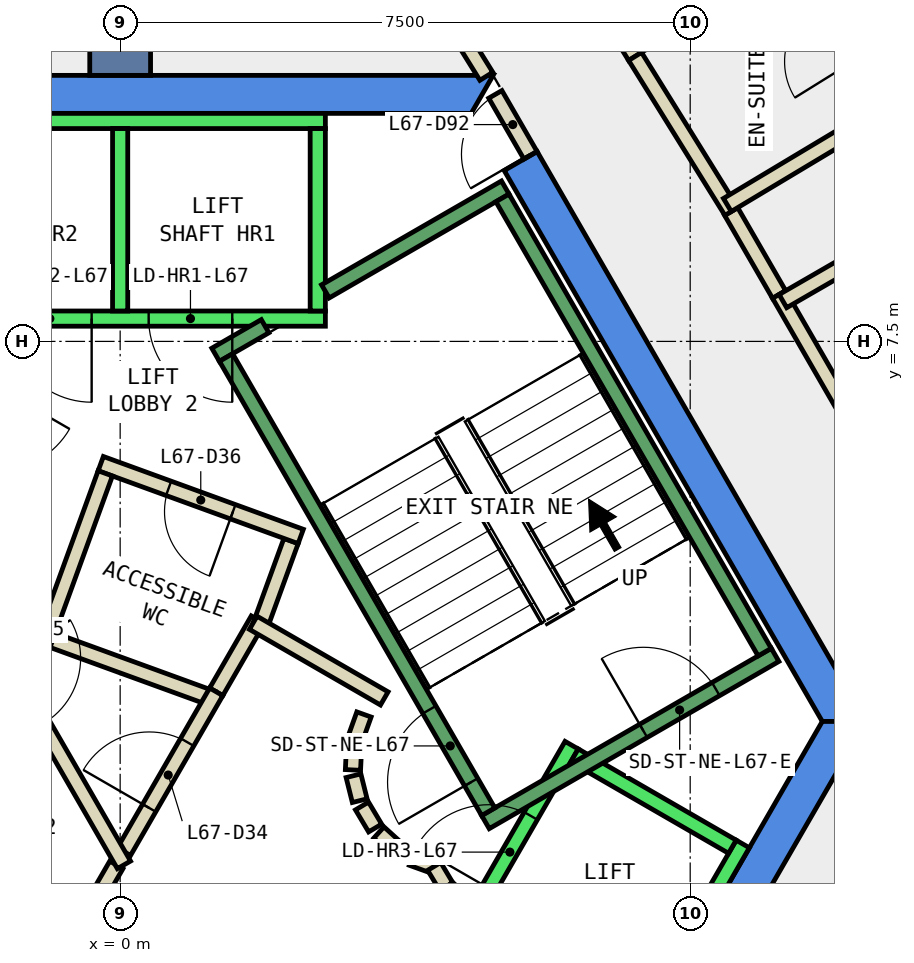
"""IFC4 building model, lengths in metres.
Left out: names, types, materials, properties, quantities, classifications, styles, units other than length and angle.
Written with IfcOpenShell. Run it as: python <this file> out.ifc"""

import sys

from ifc_helpers import new_model, si_unit, direction, frame, frame_2d, origin, place, context, subcontext, project, spatial, polyline, rectangle, outline, extrude, element, fill, save


model = new_model("IFC4")
c1 = context("Model", 3, precision=1e-05, world=origin(), true_north=direction((0.0, 1.0)))
c2 = subcontext(c1, "Body", "Model", "MODEL_VIEW")
j1 = project(units=[si_unit("LENGTHUNIT", "METRE"), si_unit("PLANEANGLEUNIT", "RADIAN")], contexts=[c1])
p1 = place(None, origin())
s1 = spatial("IfcSite", under=j1, at=p1, CompositionType="ELEMENT")
p2 = place(p1, origin())
s2 = spatial("IfcBuilding", under=s1, at=p2, CompositionType="ELEMENT")
p3 = place(p2, frame((0.0, 0.0, 290.0)))
s3 = spatial("IfcBuildingStorey", under=s2, at=p3, CompositionType="ELEMENT", Elevation=290.0)
p4 = place(p3, frame((0.0, 0.0, -0.34)))
e1 = element("IfcWall", 1, at=p4, inside=s3, PredefinedType="SHEAR", context=c2, shape_type="SweptSolid", body=[
    extrude(outline(polyline([(5.486, 9.998), (5.053, 9.748), (9.238, 2.5), (9.815, 2.5), (5.486, 9.998)])), origin(), (0.0, 0.0, 1.0), 3.6),
])
p5 = place(p3, frame((0.0, 0.0, -0.34)))
e2 = element("IfcWall", 2, at=p5, inside=s3, PredefinedType="SHEAR", context=c2, shape_type="SweptSolid", body=[
    extrude(outline(polyline([(4.907, 11.0), (-4.907, 11.0), (-4.619, 10.5), (4.619, 10.5), (4.907, 11.0)])), origin(), (0.0, 0.0, 1.0), 3.6),
])
p6 = place(p3, frame((0.0, 0.0, -0.34)))
e3 = element("IfcWall", 3, at=p6, inside=s3, PredefinedType="SHEAR", context=c2, shape_type="SweptSolid", body=[
    extrude(outline(polyline([(4.907, -6.0), (9.815, 2.5), (9.238, 2.5), (4.619, -5.5), (4.907, -6.0)])), origin(), (0.0, 0.0, 1.0), 3.6),
])
p7 = place(p3, frame((0.0, 11.0, -0.34), z_axis=(0.0, 0.0, 1.0), x_axis=(0.0, 1.0, 0.0)))
e4 = element("IfcWall", 4, at=p7, inside=s3, PredefinedType="SHEAR", context=c2, shape_type="SweptSolid", body=[
    extrude(rectangle(XDim=9.0, YDim=0.8, at=frame_2d((4.5, 0.0))), origin(), (0.0, 0.0, 1.0), 3.6),
])
p8 = place(p3, frame((1.264, 2.89, 0.0), z_axis=(0.0, 0.0, 1.0), x_axis=(0.500043792738, 0.866000118559, 0.0)))
e5 = element("IfcWall", 5, at=p8, inside=s3, PredefinedType="PARTITIONING", context=c2, shape_type="SweptSolid", body=[
    extrude(rectangle(XDim=1.096, YDim=0.2, at=frame_2d((0.548, 0.0))), origin(), (0.0, 0.0, 1.0), 3.26),
])
p9 = place(p3, frame((1.838, 3.748, 0.0), z_axis=(0.0, 0.0, 1.0), x_axis=(0.342266462435, 0.939602931398, 0.0)))
e6 = element("IfcWall", 6, at=p9, inside=s3, PredefinedType="PARTITIONING", context=c2, shape_type="SweptSolid", body=[
    extrude(rectangle(XDim=1.198, YDim=0.2, at=frame_2d((0.599, 0.0))), origin(), (0.0, 0.0, 1.0), 3.26),
])
p10 = place(p3, frame((2.376, 4.934, 0.0), z_axis=(0.0, 0.0, 1.0), x_axis=(-0.939640574808, 0.342163104635, 0.0)))
e7 = element("IfcWall", 7, at=p10, inside=s3, PredefinedType="PARTITIONING", context=c2, shape_type="SweptSolid", body=[
    extrude(rectangle(XDim=2.8, YDim=0.2, at=frame_2d((1.4, 0.0))), origin(), (0.0, 0.0, 1.0), 3.26),
])
p11 = place(p10, frame((0.95, 0.0, 0.0)))
e8 = element("IfcOpeningElement", 8, at=p11, cuts=e7, PredefinedType="OPENING", context=c2, shape_type="SweptSolid", body=[
    extrude(rectangle(XDim=0.9, YDim=2.1, at=frame_2d((0.45, 1.05))), frame((0.0, 0.11, 0.0), z_axis=(0.0, -1.0, 0.0), x_axis=(1.0, 0.0, 0.0)), (0.0, 0.0, 1.0), 0.22),
])
p12 = place(p3, frame((-0.196, 5.764, 0.0), z_axis=(0.0, 0.0, 1.0), x_axis=(-0.34165322761, -0.939826086073, 0.0)))
e9 = element("IfcWall", 9, at=p12, inside=s3, PredefinedType="PARTITIONING", context=c2, shape_type="SweptSolid", body=[
    extrude(rectangle(XDim=2.4, YDim=0.2, at=frame_2d((1.2, 0.0))), origin(), (0.0, 0.0, 1.0), 3.26),
])
p13 = place(p3, frame((-0.888, 3.568, 0.0), z_axis=(0.0, 0.0, 1.0), x_axis=(0.939685034098, -0.34204098686, 0.0)))
e10 = element("IfcWall", 10, at=p13, inside=s3, PredefinedType="PARTITIONING", context=c2, shape_type="SweptSolid", body=[
    extrude(rectangle(XDim=2.237, YDim=0.2, at=frame_2d((1.119, 0.0))), origin(), (0.0, 0.0, 1.0), 3.26),
])
p14 = place(p3, frame((2.62, 14.526, 0.0), z_axis=(0.0, 0.0, 1.0), x_axis=(0.527726136463, -0.84941457775, 0.0)))
e11 = element("IfcWall", 11, at=p14, inside=s3, PredefinedType="PARTITIONING", context=c2, shape_type="SweptSolid", body=[
    extrude(rectangle(XDim=4.165, YDim=0.2, at=frame_2d((2.083, 0.0))), origin(), (0.0, 0.0, 1.0), 2.4),
])
p15 = place(p14, frame((1.583, 0.0, 0.0)))
e12 = element("IfcOpeningElement", 12, at=p15, cuts=e11, PredefinedType="OPENING", context=c2, shape_type="SweptSolid", body=[
    extrude(rectangle(XDim=1.0, YDim=2.1, at=frame_2d((0.5, 1.05))), frame((0.0, 0.11, 0.0), z_axis=(0.0, -1.0, 0.0), x_axis=(1.0, 0.0, 0.0)), (0.0, 0.0, 1.0), 0.22),
])
p16 = place(p3, frame((8.039, 9.209, 0.0), z_axis=(0.0, 0.0, 1.0), x_axis=(0.500219543227, -0.865898613334, 0.0)))
e13 = element("IfcWall", 13, at=p16, inside=s3, PredefinedType="PARTITIONING", context=c2, shape_type="SweptSolid", body=[
    extrude(rectangle(XDim=1.261, YDim=0.2, at=frame_2d((0.631, 0.0))), origin(), (0.0, 0.0, 1.0), 3.26),
])
p17 = place(p3, frame((8.67, 8.117, 0.0), z_axis=(0.0, 0.0, 1.0), x_axis=(0.50002537861, -0.866010750942, 0.0)))
e14 = element("IfcWall", 14, at=p17, inside=s3, PredefinedType="PARTITIONING", context=c2, shape_type="SweptSolid", body=[
    extrude(rectangle(XDim=3.0, YDim=0.2, at=frame_2d((1.5, 0.0))), origin(), (0.0, 0.0, 1.0), 3.26),
])
p18 = place(p3, frame((4.022, 15.68, 0.0), z_axis=(0.0, 0.0, 1.0), x_axis=(0.527737948498, -0.849407239029, 0.0)))
e15 = element("IfcWall", 15, at=p18, inside=s3, PredefinedType="PARTITIONING", context=c2, shape_type="SweptSolid", body=[
    extrude(rectangle(XDim=5.217, YDim=0.2, at=frame_2d((2.608, 0.0))), origin(), (0.0, 0.0, 1.0), 3.26),
])
p19 = place(p18, frame((2.159, 0.0, 0.0)))
e16 = element("IfcOpeningElement", 16, at=p19, cuts=e15, PredefinedType="OPENING", context=c2, shape_type="SweptSolid", body=[
    extrude(rectangle(XDim=1.0, YDim=2.1, at=frame_2d((0.5, 1.05))), frame((0.0, 0.11, 0.0), z_axis=(0.0, -1.0, 0.0), x_axis=(1.0, 0.0, 0.0)), (0.0, 0.0, 1.0), 0.22),
])
p20 = place(p3, frame((6.775, 11.249, 0.0), z_axis=(0.0, 0.0, 1.0), x_axis=(0.527803270752, -0.849366650736, 0.0)))
e17 = element("IfcWall", 17, at=p20, inside=s3, PredefinedType="PARTITIONING", context=c2, shape_type="SweptSolid", body=[
    extrude(rectangle(XDim=2.401, YDim=0.2, at=frame_2d((1.2, 0.0))), origin(), (0.0, 0.0, 1.0), 3.26),
])
p21 = place(p3, frame((-0.982, -1.0, 0.0), z_axis=(0.0, 0.0, 1.0), x_axis=(0.50024047865, 0.865886518847, 0.0)))
e18 = element("IfcWall", 18, at=p21, inside=s3, PredefinedType="PARTITIONING", context=c2, shape_type="SweptSolid", body=[
    extrude(rectangle(XDim=1.863, YDim=0.2, at=frame_2d((0.931, 0.0))), origin(), (0.0, 0.0, 1.0), 3.26),
])
p22 = place(p3, frame((0.05, 0.787, 0.0), z_axis=(0.0, 0.0, 1.0), x_axis=(0.499945861543, 0.866056658381, 0.0)))
e19 = element("IfcWall", 19, at=p22, inside=s3, PredefinedType="PARTITIONING", context=c2, shape_type="SweptSolid", body=[
    extrude(rectangle(XDim=2.428, YDim=0.2, at=frame_2d((1.214, 0.0))), origin(), (0.0, 0.0, 1.0), 3.26),
])
p23 = place(p22, frame((0.664, 0.0, 0.0)))
e20 = element("IfcOpeningElement", 20, at=p23, cuts=e19, PredefinedType="OPENING", context=c2, shape_type="SweptSolid", body=[
    extrude(rectangle(XDim=1.0, YDim=2.1, at=frame_2d((0.5, 1.05))), frame((0.0, 0.11, 0.0), z_axis=(0.0, -1.0, 0.0), x_axis=(1.0, 0.0, 0.0)), (0.0, 0.0, 1.0), 0.22),
])
p24 = place(p3, frame((1.751, 3.798, 0.0), z_axis=(0.0, 0.0, 1.0), x_axis=(0.866091650241, -0.499885240213, 0.0)))
e21 = element("IfcWall", 21, at=p24, inside=s3, PredefinedType="PARTITIONING", context=c2, shape_type="SweptSolid", body=[
    extrude(rectangle(XDim=1.991, YDim=0.2, at=frame_2d((0.995, 0.0))), origin(), (0.0, 0.0, 1.0), 3.26),
])
p25 = place(p3, frame((3.208, 2.592, 0.0), z_axis=(0.0, 0.0, 1.0), x_axis=(-0.337388820924, -0.941365382578, 0.0)))
e22 = element("IfcWall", 22, at=p25, inside=s3, PredefinedType="PARTITIONING", context=c2, shape_type="SweptSolid", body=[
    extrude(rectangle(XDim=0.338, YDim=0.2, at=frame_2d((0.169, 0.0))), origin(), (0.0, 0.0, 1.0), 3.26),
])
p26 = place(p3, frame((3.079, 2.199, 0.0), z_axis=(0.0, 0.0, 1.0), x_axis=(-0.047771483479, -0.998858290933, 0.0)))
e23 = element("IfcWall", 23, at=p26, inside=s3, PredefinedType="PARTITIONING", context=c2, shape_type="SweptSolid", body=[
    extrude(rectangle(XDim=0.337, YDim=0.2, at=frame_2d((0.169, 0.0))), origin(), (0.0, 0.0, 1.0), 3.26),
])
p27 = place(p3, frame((3.07, 1.786, 0.0), z_axis=(0.0, 0.0, 1.0), x_axis=(0.242705583207, -0.970099994784, 0.0)))
e24 = element("IfcWall", 24, at=p27, inside=s3, PredefinedType="PARTITIONING", context=c2, shape_type="SweptSolid", body=[
    extrude(rectangle(XDim=0.338, YDim=0.2, at=frame_2d((0.169, 0.0))), origin(), (0.0, 0.0, 1.0), 3.26),
])
for number, where, z_axis, x_axis in (
    (25, (3.182, 1.388, 0.0), (0.0, 0.0, 1.0), (0.512, -0.859, 0.0)),
    (26, (3.404, 1.039, 0.0), (0.0, 0.0, 1.0), (0.74, -0.672, 0.0)),
):
    element("IfcWall", number, at=place(p3, frame(where, z_axis=z_axis, x_axis=x_axis)), inside=s3, PredefinedType="PARTITIONING", context=c2, shape_type="SweptSolid", body=[
        extrude(rectangle(XDim=0.338, YDim=0.2, at=frame_2d((0.169, 0.0))), origin(), (0.0, 0.0, 1.0), 3.26),
    ])
p28 = place(p3, frame((3.838, 0.702, 0.0), z_axis=(0.0, 0.0, 1.0), x_axis=(0.941035081519, -0.338308993895, 0.0)))
e27 = element("IfcWall", 27, at=p28, inside=s3, PredefinedType="PARTITIONING", context=c2, shape_type="SweptSolid", body=[
    extrude(rectangle(XDim=0.337, YDim=0.2, at=frame_2d((0.168, 0.0))), origin(), (0.0, 0.0, 1.0), 3.26),
])
p29 = place(p3, frame((4.132, 0.593, 0.0), z_axis=(0.0, 0.0, 1.0), x_axis=(0.513561617048, -0.858052717201, 0.0)))
e28 = element("IfcWall", 28, at=p29, inside=s3, PredefinedType="PARTITIONING", context=c2, shape_type="SweptSolid", body=[
    extrude(rectangle(XDim=0.308, YDim=0.2, at=frame_2d((0.154, 0.0))), origin(), (0.0, 0.0, 1.0), 3.26),
])
p30 = place(p3, frame((4.301, 0.315, 0.0), z_axis=(0.0, 0.0, 1.0), x_axis=(0.741798017506, -0.670623367639, 0.0)))
e29 = element("IfcWall", 29, at=p30, inside=s3, PredefinedType="PARTITIONING", context=c2, shape_type="SweptSolid", body=[
    extrude(rectangle(XDim=0.309, YDim=0.2, at=frame_2d((0.154, 0.0))), origin(), (0.0, 0.0, 1.0), 3.26),
])
p31 = place(p3, frame((-2.54, 5.1, 0.0), z_axis=(0.0, 0.0, 1.0), x_axis=(0.499925051871, -0.866068670783, 0.0)))
e30 = element("IfcWall", 30, at=p31, inside=s3, PredefinedType="PARTITIONING", context=c2, shape_type="SweptSolid", body=[
    extrude(rectangle(XDim=5.181, YDim=0.2, at=frame_2d((2.59, 0.0))), origin(), (0.0, 0.0, 1.0), 3.26),
])
p32 = place(p31, frame((2.04, 0.0, 0.0)))
e31 = element("IfcOpeningElement", 31, at=p32, cuts=e30, PredefinedType="OPENING", context=c2, shape_type="SweptSolid", body=[
    extrude(rectangle(XDim=1.0, YDim=2.1, at=frame_2d((0.5, 1.05))), frame((0.0, 0.11, 0.0), z_axis=(0.0, -1.0, 0.0), x_axis=(1.0, 0.0, 0.0)), (0.0, 0.0, 1.0), 0.22),
])
p33 = place(p3, frame((10.885, 9.28, 0.0), z_axis=(0.0, 0.0, 1.0), x_axis=(-0.866022959057, -0.500004234368, 0.0)))
e32 = element("IfcWall", 32, at=p33, inside=s3, PredefinedType="PARTITIONING", context=c2, shape_type="SweptSolid", body=[
    extrude(rectangle(XDim=2.5, YDim=0.2, at=frame_2d((1.25, 0.0))), origin(), (0.0, 0.0, 1.0), 3.26),
])
p34 = place(p3, frame((7.989, 9.295, 0.0), z_axis=(0.0, 0.0, 1.0), x_axis=(0.857801856135, 0.513980520654, 0.0)))
e33 = element("IfcWall", 33, at=p34, inside=s3, PredefinedType="PARTITIONING", context=c2, shape_type="SweptSolid", body=[
    extrude(rectangle(XDim=2.3, YDim=0.2, at=frame_2d((1.15, 0.0))), origin(), (0.0, 0.0, 1.0), 3.26),
])
p35 = place(p3, frame((10.1, 10.443, 0.0), z_axis=(0.0, 0.0, 1.0), x_axis=(-0.527510239672, 0.849548672555, 0.0)))
e34 = element("IfcWall", 34, at=p35, inside=s3, PredefinedType="PARTITIONING", context=c2, shape_type="SweptSolid", body=[
    extrude(rectangle(XDim=2.639, YDim=0.2, at=frame_2d((1.319, 0.0))), origin(), (0.0, 0.0, 1.0), 3.26),
])
p36 = place(p35, frame((0.869, 0.0, 0.0)))
e35 = element("IfcOpeningElement", 35, at=p36, cuts=e34, PredefinedType="OPENING", context=c2, shape_type="SweptSolid", body=[
    extrude(rectangle(XDim=0.9, YDim=2.1, at=frame_2d((0.45, 1.05))), frame((0.0, 0.11, 0.0), z_axis=(0.0, -1.0, 0.0), x_axis=(1.0, 0.0, 0.0)), (0.0, 0.0, 1.0), 0.22),
])
p37 = place(p3, frame((5.399, 9.948, 0.0), z_axis=(0.0, 0.0, 1.0), x_axis=(-0.499882215713, 0.866093395895, 0.0)))
e36 = element("IfcWall", 36, at=p37, inside=s3, PredefinedType="PARTITIONING", context=c2, shape_type="SweptSolid", body=[
    extrude(rectangle(XDim=0.926, YDim=0.2, at=frame_2d((0.463, 0.0))), origin(), (0.0, 0.0, 1.0), 2.4),
])
p38 = place(p37, frame((0.017, 0.0, 0.0)))
e37 = element("IfcOpeningElement", 37, at=p38, cuts=e36, PredefinedType="OPENING", context=c2, shape_type="SweptSolid", body=[
    extrude(rectangle(XDim=0.9, YDim=2.1, at=frame_2d((0.45, 1.05))), frame((0.0, 0.11, 0.0), z_axis=(0.0, -1.0, 0.0), x_axis=(1.0, 0.0, 0.0)), (0.0, 0.0, 1.0), 0.22),
])
p39 = place(p3, frame((2.7, 7.8, 0.0), z_axis=(0.0, 0.0, 1.0), x_axis=(-1.0, 0.0, 0.0)))
e38 = element("IfcWall", 38, at=p39, inside=s3, PredefinedType="STANDARD", context=c2, shape_type="SweptSolid", body=[
    extrude(rectangle(XDim=5.4, YDim=0.2, at=frame_2d((2.7, 0.0))), origin(), (0.0, 0.0, 1.0), 3.26),
])
p40 = place(p39, frame((1.225, 0.0, 0.0)))
e39 = element("IfcOpeningElement", 39, at=p40, cuts=e38, PredefinedType="OPENING", context=c2, shape_type="SweptSolid", body=[
    extrude(rectangle(XDim=1.1, YDim=2.1, at=frame_2d((0.55, 1.05))), frame((0.0, 0.11, 0.0), z_axis=(0.0, -1.0, 0.0), x_axis=(1.0, 0.0, 0.0)), (0.0, 0.0, 1.0), 0.22),
])
p41 = place(p39, frame((3.075, 0.0, 0.0)))
e40 = element("IfcOpeningElement", 40, at=p41, cuts=e38, PredefinedType="OPENING", context=c2, shape_type="SweptSolid", body=[
    extrude(rectangle(XDim=1.1, YDim=2.1, at=frame_2d((0.55, 1.05))), frame((0.0, 0.11, 0.0), z_axis=(0.0, -1.0, 0.0), x_axis=(1.0, 0.0, 0.0)), (0.0, 0.0, 1.0), 0.22),
])
p42 = place(p3, frame((2.7, 10.4, 0.0), z_axis=(0.0, 0.0, 1.0), x_axis=(-1.0, 0.0, 0.0)))
e41 = element("IfcWall", 41, at=p42, inside=s3, PredefinedType="STANDARD", context=c2, shape_type="SweptSolid", body=[
    extrude(rectangle(XDim=5.4, YDim=0.2, at=frame_2d((2.7, 0.0))), origin(), (0.0, 0.0, 1.0), 3.26),
])
for number, where, z_axis, x_axis in (
    (42, (2.6, 7.9, 0.0), (0.0, 0.0, 1.0), (0.0, 1.0, 0.0)),
    (43, (0.0, 7.9, 0.0), (0.0, 0.0, 1.0), (0.0, 1.0, 0.0)),
):
    element("IfcWall", number, at=place(p3, frame(where, z_axis=z_axis, x_axis=x_axis)), inside=s3, PredefinedType="STANDARD", context=c2, shape_type="SweptSolid", body=[
        extrude(rectangle(XDim=2.4, YDim=0.2, at=frame_2d((1.2, 0.0))), origin(), (0.0, 0.0, 1.0), 3.26),
    ])
p43 = place(p3, frame((3.24, -2.488, 0.0), z_axis=(0.0, 0.0, 1.0), x_axis=(0.500034260056, 0.866005622828, 0.0)))
e44 = element("IfcWall", 44, at=p43, inside=s3, PredefinedType="STANDARD", context=c2, shape_type="SweptSolid", body=[
    extrude(rectangle(XDim=5.399, YDim=0.2, at=frame_2d((2.7, 0.0))), origin(), (0.0, 0.0, 1.0), 3.26),
])
p44 = place(p43, frame((3.225, 0.0, 0.0)))
e45 = element("IfcOpeningElement", 45, at=p44, cuts=e44, PredefinedType="OPENING", context=c2, shape_type="SweptSolid", body=[
    extrude(rectangle(XDim=1.1, YDim=2.1, at=frame_2d((0.55, 1.05))), frame((0.0, 0.11, 0.0), z_axis=(0.0, -1.0, 0.0), x_axis=(1.0, 0.0, 0.0)), (0.0, 0.0, 1.0), 0.22),
])
p45 = place(p43, frame((1.225, 0.0, 0.0)))
e46 = element("IfcOpeningElement", 46, at=p45, cuts=e44, PredefinedType="OPENING", context=c2, shape_type="SweptSolid", body=[
    extrude(rectangle(XDim=1.1, YDim=2.1, at=frame_2d((0.55, 1.05))), frame((0.0, 0.11, 0.0), z_axis=(0.0, -1.0, 0.0), x_axis=(1.0, 0.0, 0.0)), (0.0, 0.0, 1.0), 0.22),
])
p46 = place(p3, frame((5.492, -3.788, 0.0), z_axis=(0.0, 0.0, 1.0), x_axis=(0.500034260056, 0.866005622828, 0.0)))
e47 = element("IfcWall", 47, at=p46, inside=s3, PredefinedType="STANDARD", context=c2, shape_type="SweptSolid", body=[
    extrude(rectangle(XDim=5.399, YDim=0.2, at=frame_2d((2.7, 0.0))), origin(), (0.0, 0.0, 1.0), 3.26),
])
p47 = place(p3, frame((5.977, 2.052, 0.0), z_axis=(0.0, 0.0, 1.0), x_axis=(0.865973769406, -0.500089422704, 0.0)))
e48 = element("IfcWall", 48, at=p47, inside=s3, PredefinedType="STANDARD", context=c2, shape_type="SweptSolid", body=[
    extrude(rectangle(XDim=2.399, YDim=0.2, at=frame_2d((1.2, 0.0))), origin(), (0.0, 0.0, 1.0), 3.26),
])
p48 = place(p3, frame((4.806, 1.176, 0.0), z_axis=(0.0, 0.0, 1.0), x_axis=(0.866059941101, 0.499940174841, 0.0)))
e49 = element("IfcWall", 49, at=p48, inside=s3, PredefinedType="STANDARD", context=c2, shape_type="SweptSolid", body=[
    extrude(rectangle(XDim=4.4, YDim=0.2, at=frame_2d((2.2, 0.0))), origin(), (0.0, 0.0, 1.0), 3.26),
])
p49 = place(p48, frame((2.4, 0.0, 0.0)))
e50 = element("IfcOpeningElement", 50, at=p49, cuts=e49, PredefinedType="OPENING", context=c2, shape_type="SweptSolid", body=[
    extrude(rectangle(XDim=1.1, YDim=2.2, at=frame_2d((0.55, 1.1))), frame((0.0, 0.11, 0.0), z_axis=(0.0, -1.0, 0.0), x_axis=(1.0, 0.0, 0.0)), (0.0, 0.0, 1.0), 0.22),
])
p50 = place(p3, frame((2.7, 8.158, 0.0), z_axis=(0.0, 0.0, 1.0), x_axis=(0.86611865017, 0.499838457731, 0.0)))
e51 = element("IfcWall", 51, at=p50, inside=s3, PredefinedType="STANDARD", context=c2, shape_type="SweptSolid", body=[
    extrude(rectangle(XDim=2.733, YDim=0.2, at=frame_2d((1.366, 0.0))), origin(), (0.0, 0.0, 1.0), 3.26),
])
p51 = place(p3, frame((1.256, 7.324, 0.0), z_axis=(0.0, 0.0, 1.0), x_axis=(0.865915093549, 0.500191014278, 0.0)))
e52 = element("IfcWall", 52, at=p51, inside=s3, PredefinedType="STANDARD", context=c2, shape_type="SweptSolid", body=[
    extrude(rectangle(XDim=0.752, YDim=0.2, at=frame_2d((0.376, 0.0))), origin(), (0.0, 0.0, 1.0), 3.26),
])
p52 = place(p3, frame((4.843, 1.312, 0.0), z_axis=(0.0, 0.0, 1.0), x_axis=(-0.499963383562, 0.866046543262, 0.0)))
e53 = element("IfcWall", 53, at=p52, inside=s3, PredefinedType="STANDARD", context=c2, shape_type="SweptSolid", body=[
    extrude(rectangle(XDim=6.9, YDim=0.2, at=frame_2d((3.45, 0.0))), origin(), (0.0, 0.0, 1.0), 3.26),
])
p53 = place(p52, frame((0.45, 0.0, 0.0)))
e54 = element("IfcOpeningElement", 54, at=p53, cuts=e53, PredefinedType="OPENING", context=c2, shape_type="SweptSolid", body=[
    extrude(rectangle(XDim=1.1, YDim=2.2, at=frame_2d((0.55, 1.1))), frame((0.0, 0.11, 0.0), z_axis=(0.0, -1.0, 0.0), x_axis=(1.0, 0.0, 0.0)), (0.0, 0.0, 1.0), 0.22),
])
p54 = place(p3, frame((8.48, 3.412, 0.0), z_axis=(0.0, 0.0, 1.0), x_axis=(-0.499978703459, 0.866037698999, 0.0)))
e55 = element("IfcWall", 55, at=p54, inside=s3, PredefinedType="STANDARD", context=c2, shape_type="SweptSolid", body=[
    extrude(rectangle(XDim=6.9, YDim=0.2, at=frame_2d((3.45, 0.0))), origin(), (0.0, 0.0, 1.0), 3.26),
])
p55 = place(p36, origin())
e56 = element("IfcDoor", 56, at=p55, inside=s3, OperationType="SINGLE_SWING_LEFT", PredefinedType="DOOR", context=c2, shape_type="SweptSolid", body=[
    extrude(rectangle(XDim=0.9, YDim=2.1, at=frame_2d((0.45, 1.05))), frame((0.0, 0.025, 0.0), z_axis=(0.0, -1.0, 0.0), x_axis=(1.0, 0.0, 0.0)), (0.0, 0.0, 1.0), 0.05),
])
fill(e35, e56)
p56 = place(p23, origin())
e57 = element("IfcDoor", 57, at=p56, inside=s3, OperationType="SINGLE_SWING_RIGHT", PredefinedType="DOOR", context=c2, shape_type="SweptSolid", body=[
    extrude(rectangle(XDim=1.0, YDim=2.1, at=frame_2d((0.5, 1.05))), frame((0.0, 0.025, 0.0), z_axis=(0.0, -1.0, 0.0), x_axis=(1.0, 0.0, 0.0)), (0.0, 0.0, 1.0), 0.05),
])
fill(e20, e57)
p57 = place(p11, origin())
e58 = element("IfcDoor", 58, at=p57, inside=s3, OperationType="SINGLE_SWING_LEFT", PredefinedType="DOOR", context=c2, shape_type="SweptSolid", body=[
    extrude(rectangle(XDim=0.9, YDim=2.1, at=frame_2d((0.45, 1.05))), frame((0.0, 0.025, 0.0), z_axis=(0.0, -1.0, 0.0), x_axis=(1.0, 0.0, 0.0)), (0.0, 0.0, 1.0), 0.05),
])
fill(e8, e58)
p58 = place(p38, origin())
e59 = element("IfcDoor", 59, at=p58, inside=s3, OperationType="SINGLE_SWING_LEFT", PredefinedType="DOOR", context=c2, shape_type="SweptSolid", body=[
    extrude(rectangle(XDim=0.9, YDim=2.1, at=frame_2d((0.45, 1.05))), frame((0.0, 0.025, 0.0), z_axis=(0.0, -1.0, 0.0), x_axis=(1.0, 0.0, 0.0)), (0.0, 0.0, 1.0), 0.05),
])
fill(e37, e59)
p59 = place(p40, origin())
e60 = element("IfcDoor", 60, at=p59, inside=s3, OperationType="SLIDING_TO_LEFT", PredefinedType="DOOR", context=c2, shape_type="SweptSolid", body=[
    extrude(rectangle(XDim=1.1, YDim=2.1, at=frame_2d((0.55, 1.05))), frame((0.0, 0.025, 0.0), z_axis=(0.0, -1.0, 0.0), x_axis=(1.0, 0.0, 0.0)), (0.0, 0.0, 1.0), 0.05),
])
fill(e39, e60)
p60 = place(p41, origin())
e61 = element("IfcDoor", 61, at=p60, inside=s3, OperationType="SLIDING_TO_LEFT", PredefinedType="DOOR", context=c2, shape_type="SweptSolid", body=[
    extrude(rectangle(XDim=1.1, YDim=2.1, at=frame_2d((0.55, 1.05))), frame((0.0, 0.025, 0.0), z_axis=(0.0, -1.0, 0.0), x_axis=(1.0, 0.0, 0.0)), (0.0, 0.0, 1.0), 0.05),
])
fill(e40, e61)
p61 = place(p44, origin())
e62 = element("IfcDoor", 62, at=p61, inside=s3, OperationType="SLIDING_TO_LEFT", PredefinedType="DOOR", context=c2, shape_type="SweptSolid", body=[
    extrude(rectangle(XDim=1.1, YDim=2.1, at=frame_2d((0.55, 1.05))), frame((0.0, 0.025, 0.0), z_axis=(0.0, -1.0, 0.0), x_axis=(1.0, 0.0, 0.0)), (0.0, 0.0, 1.0), 0.05),
])
fill(e45, e62)
p62 = place(p53, origin())
e63 = element("IfcDoor", 63, at=p62, inside=s3, OperationType="SINGLE_SWING_LEFT", PredefinedType="DOOR", context=c2, shape_type="SweptSolid", body=[
    extrude(rectangle(XDim=1.1, YDim=2.2, at=frame_2d((0.55, 1.1))), frame((0.0, 0.025, 0.0), z_axis=(0.0, -1.0, 0.0), x_axis=(1.0, 0.0, 0.0)), (0.0, 0.0, 1.0), 0.05),
])
fill(e54, e63)
p63 = place(p49, origin())
e64 = element("IfcDoor", 64, at=p63, inside=s3, OperationType="SINGLE_SWING_LEFT", PredefinedType="DOOR", context=c2, shape_type="SweptSolid", body=[
    extrude(rectangle(XDim=1.1, YDim=2.2, at=frame_2d((0.55, 1.1))), frame((0.0, 0.025, 0.0), z_axis=(0.0, -1.0, 0.0), x_axis=(1.0, 0.0, 0.0)), (0.0, 0.0, 1.0), 0.05),
])
fill(e50, e64)
save(model, sys.argv[1])
